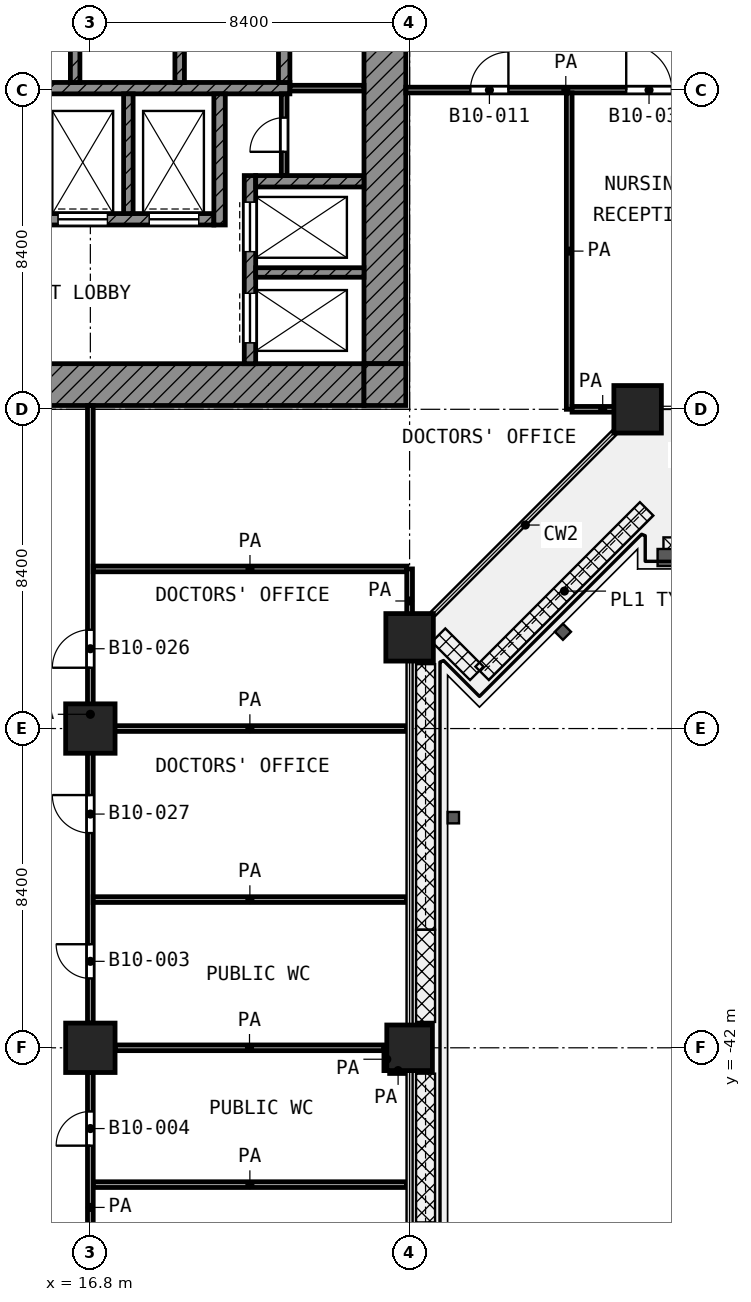
"""IFC4 building model, lengths in metres.
Left out: names, types, materials, properties, quantities, classifications, styles, units other than length and angle.
Written with IfcOpenShell. Run it as: python <this file> out.ifc"""

import sys

from ifc_helpers import new_model, si_unit, direction, frame, frame_2d, origin, origin_2d, place, context, subcontext, project, spatial, rectangle, extrude, element, fill, save


model = new_model("IFC4")
c1 = context("Model", 3, precision=1e-05, world=origin(), true_north=direction((0.0, 1.0)))
c2 = subcontext(c1, "Body", "Model", "MODEL_VIEW")
j1 = project(units=[si_unit("LENGTHUNIT", "METRE"), si_unit("PLANEANGLEUNIT", "RADIAN")], contexts=[c1])
p1 = place(None, origin())
s1 = spatial("IfcSite", under=j1, at=p1, CompositionType="ELEMENT")
p2 = place(p1, origin())
s2 = spatial("IfcBuilding", under=s1, at=p2, CompositionType="ELEMENT")
p3 = place(p2, frame((0.0, 0.0, 47.6)))
s3 = spatial("IfcBuildingStorey", under=s2, at=p3, CompositionType="ELEMENT", Elevation=47.6)
for number, where, z_axis, x_axis in (
    (1, (31.2, -25.2, 0.0), (0.0, 0.0, 1.0), (1.0, 0.0, 0.0)),
    (2, (25.2, -31.2, 0.0), (0.0, 0.0, 1.0), (1.0, 0.0, 0.0)),
):
    element("IfcColumn", number, at=place(p3, frame(where, z_axis=z_axis, x_axis=x_axis)), inside=s3, PredefinedType="COLUMN", context=c2, shape_type="SweptSolid", body=[
        extrude(rectangle(XDim=1.25, YDim=1.25, at=origin_2d()), origin(), (0.0, 0.0, 1.0), 4.2),
    ])
for number, where, z_axis, x_axis in (
    (3, (16.8, -33.6, 0.0), (0.0, 0.0, 1.0), (1.0, 0.0, 0.0)),
    (4, (16.8, -42.0, 0.0), (0.0, 0.0, 1.0), (1.0, 0.0, 0.0)),
):
    element("IfcColumn", number, at=place(p3, frame(where, z_axis=z_axis, x_axis=x_axis)), inside=s3, PredefinedType="COLUMN", context=c2, shape_type="SweptSolid", body=[
        extrude(rectangle(XDim=1.3, YDim=1.3, at=origin_2d()), origin(), (0.0, 0.0, 1.0), 4.2),
    ])
p4 = place(p3, frame((25.2, -42.0, 0.0), z_axis=(0.0, 0.0, 1.0), x_axis=(1.0, 0.0, 0.0)))
e5 = element("IfcColumn", 5, at=p4, inside=s3, PredefinedType="COLUMN", context=c2, shape_type="SweptSolid", body=[
    extrude(rectangle(XDim=1.2, YDim=1.2, at=origin_2d()), origin(), (0.0, 0.0, 1.0), 4.2),
])
p5 = place(p3, frame((24.55, -24.0, 0.0), z_axis=(0.0, 0.0, 1.0), x_axis=(0.0, 1.0, 0.0)))
e6 = element("IfcWall", 6, at=p5, inside=s3, PredefinedType="SHEAR", context=c2, shape_type="SweptSolid", body=[
    extrude(rectangle(XDim=18.6, YDim=1.1, at=frame_2d((9.3, 0.0))), origin(), (0.0, 0.0, 1.0), 3.78),
])
p6 = place(p5, frame((10.5, 0.0, 0.0)))
e7 = element("IfcOpeningElement", 7, at=p6, cuts=e6, PredefinedType="OPENING", context=c2, shape_type="SweptSolid", body=[
    extrude(rectangle(XDim=1.8, YDim=2.1, at=frame_2d((0.9, 1.05))), frame((0.0, 0.56, 0.0), z_axis=(0.0, -1.0, 0.0), x_axis=(1.0, 0.0, 0.0)), (0.0, 0.0, 1.0), 1.12),
])
p7 = place(p3, frame((5.4, -24.55, 0.0), z_axis=(0.0, 0.0, 1.0), x_axis=(1.0, 0.0, 0.0)))
e8 = element("IfcWall", 8, at=p7, inside=s3, PredefinedType="SHEAR", context=c2, shape_type="SweptSolid", body=[
    extrude(rectangle(XDim=18.6, YDim=1.1, at=frame_2d((9.3, 0.0))), origin(), (0.0, 0.0, 1.0), 3.78),
])
p8 = place(p7, frame((6.3, 0.0, 0.0)))
e9 = element("IfcOpeningElement", 9, at=p8, cuts=e8, PredefinedType="OPENING", context=c2, shape_type="SweptSolid", body=[
    extrude(rectangle(XDim=1.8, YDim=2.1, at=frame_2d((0.9, 1.05))), frame((0.0, 0.56, 0.0), z_axis=(0.0, -1.0, 0.0), x_axis=(1.0, 0.0, 0.0)), (0.0, 0.0, 1.0), 1.12),
])
p9 = place(p3, frame((24.55, -25.1, 0.0), z_axis=(0.0, 0.0, 1.0), x_axis=(0.0, 1.0, 0.0)))
e10 = element("IfcWall", 10, at=p9, inside=s3, PredefinedType="SHEAR", context=c2, shape_type="SweptSolid", body=[
    extrude(rectangle(XDim=1.1, YDim=1.1, at=frame_2d((0.55, 0.0))), origin(), (0.0, 0.0, 1.0), 3.78),
])
p10 = place(p3, frame((5.4, -16.75, 0.0), z_axis=(0.0, 0.0, 1.0), x_axis=(1.0, 0.0, 0.0)))
e11 = element("IfcWall", 11, at=p10, inside=s3, PredefinedType="SHEAR", context=c2, shape_type="SweptSolid", body=[
    extrude(rectangle(XDim=16.65, YDim=0.3, at=frame_2d((8.325, 0.0))), origin(), (0.0, 0.0, 1.0), 3.78),
])
p11 = place(p3, frame((5.4, -20.2, 0.0), z_axis=(0.0, 0.0, 1.0), x_axis=(1.0, 0.0, 0.0)))
e12 = element("IfcWall", 12, at=p11, inside=s3, PredefinedType="SHEAR", context=c2, shape_type="SweptSolid", body=[
    extrude(rectangle(XDim=14.65, YDim=0.3, at=frame_2d((7.325, 0.0))), origin(), (0.0, 0.0, 1.0), 3.78),
])
p12 = place(p11, frame((10.55, 0.0, 0.0)))
e13 = element("IfcOpeningElement", 13, at=p12, cuts=e12, PredefinedType="OPENING", context=c2, shape_type="SweptSolid", body=[
    extrude(rectangle(XDim=1.3, YDim=2.1, at=frame_2d((0.65, 1.05))), frame((0.0, 0.16, 0.0), z_axis=(0.0, -1.0, 0.0), x_axis=(1.0, 0.0, 0.0)), (0.0, 0.0, 1.0), 0.32),
])
p13 = place(p11, frame((12.95, 0.0, 0.0)))
e14 = element("IfcOpeningElement", 14, at=p13, cuts=e12, PredefinedType="OPENING", context=c2, shape_type="SweptSolid", body=[
    extrude(rectangle(XDim=1.3, YDim=2.1, at=frame_2d((0.65, 1.05))), frame((0.0, 0.16, 0.0), z_axis=(0.0, -1.0, 0.0), x_axis=(1.0, 0.0, 0.0)), (0.0, 0.0, 1.0), 0.32),
])
p14 = place(p11, frame((0.55, 0.0, 0.0)))
e15 = element("IfcOpeningElement", 15, at=p14, cuts=e12, PredefinedType="OPENING", context=c2, shape_type="SweptSolid", body=[
    extrude(rectangle(XDim=1.3, YDim=2.1, at=frame_2d((0.65, 1.05))), frame((0.0, 0.16, 0.0), z_axis=(0.0, -1.0, 0.0), x_axis=(1.0, 0.0, 0.0)), (0.0, 0.0, 1.0), 0.32),
])
p15 = place(p11, frame((2.95, 0.0, 0.0)))
e16 = element("IfcOpeningElement", 16, at=p15, cuts=e12, PredefinedType="OPENING", context=c2, shape_type="SweptSolid", body=[
    extrude(rectangle(XDim=1.3, YDim=2.1, at=frame_2d((0.65, 1.05))), frame((0.0, 0.16, 0.0), z_axis=(0.0, -1.0, 0.0), x_axis=(1.0, 0.0, 0.0)), (0.0, 0.0, 1.0), 0.32),
])
p16 = place(p11, frame((5.95, 0.0, 0.0)))
e17 = element("IfcOpeningElement", 17, at=p16, cuts=e12, PredefinedType="OPENING", context=c2, shape_type="SweptSolid", body=[
    extrude(rectangle(XDim=0.9, YDim=2.1, at=frame_2d((0.45, 1.05))), frame((0.0, 0.16, 0.0), z_axis=(0.0, -1.0, 0.0), x_axis=(1.0, 0.0, 0.0)), (0.0, 0.0, 1.0), 0.32),
])
p17 = place(p11, frame((8.35, 0.0, 0.0)))
e18 = element("IfcOpeningElement", 18, at=p17, cuts=e12, PredefinedType="OPENING", context=c2, shape_type="SweptSolid", body=[
    extrude(rectangle(XDim=0.9, YDim=2.1, at=frame_2d((0.45, 1.05))), frame((0.0, 0.16, 0.0), z_axis=(0.0, -1.0, 0.0), x_axis=(1.0, 0.0, 0.0)), (0.0, 0.0, 1.0), 0.32),
])
p18 = place(p3, frame((20.2, -20.35, 0.0), z_axis=(0.0, 0.0, 1.0), x_axis=(0.0, 1.0, 0.0)))
e19 = element("IfcWall", 19, at=p18, inside=s3, PredefinedType="SHEAR", context=c2, shape_type="SweptSolid", body=[
    extrude(rectangle(XDim=3.45, YDim=0.3, at=frame_2d((1.725, 0.0))), origin(), (0.0, 0.0, 1.0), 3.78),
])
p19 = place(p3, frame((21.9, -16.6, 0.0), z_axis=(0.0, 0.0, 1.0), x_axis=(0.0, 1.0, 0.0)))
e20 = element("IfcWall", 20, at=p19, inside=s3, PredefinedType="SHEAR", context=c2, shape_type="SweptSolid", body=[
    extrude(rectangle(XDim=2.35, YDim=0.3, at=frame_2d((1.175, 0.0))), origin(), (0.0, 0.0, 1.0), 3.78),
])
p20 = place(p3, frame((21.15, -19.2, 0.0), z_axis=(0.0, 0.0, 1.0), x_axis=(1.0, 0.0, 0.0)))
e21 = element("IfcWall", 21, at=p20, inside=s3, PredefinedType="SHEAR", context=c2, shape_type="SweptSolid", body=[
    extrude(rectangle(XDim=2.85, YDim=0.3, at=frame_2d((1.425, 0.0))), origin(), (0.0, 0.0, 1.0), 3.78),
])
p21 = place(p3, frame((21.0, -24.0, 0.0), z_axis=(0.0, 0.0, 1.0), x_axis=(0.0, 1.0, 0.0)))
e22 = element("IfcWall", 22, at=p21, inside=s3, PredefinedType="SHEAR", context=c2, shape_type="SweptSolid", body=[
    extrude(rectangle(XDim=4.95, YDim=0.3, at=frame_2d((2.475, 0.0))), origin(), (0.0, 0.0, 1.0), 3.78),
])
p22 = place(p21, frame((2.95, 0.0, 0.0)))
e23 = element("IfcOpeningElement", 23, at=p22, cuts=e22, PredefinedType="OPENING", context=c2, shape_type="SweptSolid", body=[
    extrude(rectangle(XDim=1.3, YDim=2.1, at=frame_2d((0.65, 1.05))), frame((0.0, 0.16, 0.0), z_axis=(0.0, -1.0, 0.0), x_axis=(1.0, 0.0, 0.0)), (0.0, 0.0, 1.0), 0.32),
])
p23 = place(p21, frame((0.55, 0.0, 0.0)))
e24 = element("IfcOpeningElement", 24, at=p23, cuts=e22, PredefinedType="OPENING", context=c2, shape_type="SweptSolid", body=[
    extrude(rectangle(XDim=1.3, YDim=2.1, at=frame_2d((0.65, 1.05))), frame((0.0, 0.16, 0.0), z_axis=(0.0, -1.0, 0.0), x_axis=(1.0, 0.0, 0.0)), (0.0, 0.0, 1.0), 0.32),
])
p24 = place(p3, frame((21.15, -21.6, 0.0), z_axis=(0.0, 0.0, 1.0), x_axis=(1.0, 0.0, 0.0)))
e25 = element("IfcWall", 25, at=p24, inside=s3, PredefinedType="SHEAR", context=c2, shape_type="SweptSolid", body=[
    extrude(rectangle(XDim=2.85, YDim=0.25, at=frame_2d((1.425, 0.0))), origin(), (0.0, 0.0, 1.0), 3.78),
])
p25 = place(p3, frame((17.8, -20.05, 0.0), z_axis=(0.0, 0.0, 1.0), x_axis=(0.0, 1.0, 0.0)))
e26 = element("IfcWall", 26, at=p25, inside=s3, PredefinedType="SHEAR", context=c2, shape_type="SweptSolid", body=[
    extrude(rectangle(XDim=3.15, YDim=0.25, at=frame_2d((1.575, 0.0))), origin(), (0.0, 0.0, 1.0), 3.78),
])
for number, where, z_axis, x_axis in (
    (27, (16.4, -16.6, 0.0), (0.0, 0.0, 1.0), (0.0, 1.0, 0.0)),
    (28, (19.15, -16.6, 0.0), (0.0, 0.0, 1.0), (0.0, 1.0, 0.0)),
):
    element("IfcWall", number, at=place(p3, frame(where, z_axis=z_axis, x_axis=x_axis)), inside=s3, PredefinedType="SHEAR", context=c2, shape_type="SweptSolid", body=[
        extrude(rectangle(XDim=2.35, YDim=0.25, at=frame_2d((1.175, 0.0))), origin(), (0.0, 0.0, 1.0), 3.78),
    ])
p26 = place(p3, frame((21.9, -19.05, 0.0), z_axis=(0.0, 0.0, 1.0), x_axis=(0.0, 1.0, 0.0)))
e29 = element("IfcWall", 29, at=p26, inside=s3, PredefinedType="PARTITIONING", context=c2, shape_type="SweptSolid", body=[
    extrude(rectangle(XDim=2.15, YDim=0.15, at=frame_2d((1.075, 0.0))), origin(), (0.0, 0.0, 1.0), 3.78),
])
p27 = place(p26, frame((0.625, 0.0, 0.0)))
e30 = element("IfcOpeningElement", 30, at=p27, cuts=e29, PredefinedType="OPENING", context=c2, shape_type="SweptSolid", body=[
    extrude(rectangle(XDim=0.9, YDim=2.1, at=frame_2d((0.45, 1.05))), frame((0.0, 0.085, 0.0), z_axis=(0.0, -1.0, 0.0), x_axis=(1.0, 0.0, 0.0)), (0.0, 0.0, 1.0), 0.17),
])
p28 = place(p3, frame((22.05, -16.75, 0.0), z_axis=(0.0, 0.0, 1.0), x_axis=(1.0, 0.0, 0.0)))
e31 = element("IfcWall", 31, at=p28, inside=s3, PredefinedType="PARTITIONING", context=c2, shape_type="SweptSolid", body=[
    extrude(rectangle(XDim=1.95, YDim=0.15, at=frame_2d((0.975, 0.0))), origin(), (0.0, 0.0, 1.0), 3.78),
])
p29 = place(p3, frame((16.875, -45.6, 0.0), z_axis=(0.0, 0.0, 1.0), x_axis=(1.0, 0.0, 0.0)))
e32 = element("IfcWall", 32, at=p29, inside=s3, PredefinedType="PARTITIONING", context=c2, shape_type="SweptSolid", body=[
    extrude(rectangle(XDim=8.245, YDim=0.15, at=frame_2d((4.123, 0.0))), origin(), (0.0, 0.0, 1.0), 3.78),
])
p30 = place(p3, frame((24.675, -42.6, 0.0), z_axis=(0.0, 0.0, 1.0), x_axis=(1.0, 0.0, 0.0)))
e33 = element("IfcWall", 33, at=p30, inside=s3, PredefinedType="PARTITIONING", context=c2, shape_type="SweptSolid", body=[
    extrude(rectangle(XDim=0.445, YDim=0.15, at=frame_2d((0.223, 0.0))), origin(), (0.0, 0.0, 1.0), 3.78),
])
p31 = place(p3, frame((17.452, -42.0, 0.0), z_axis=(0.0, 0.0, 1.0), x_axis=(1.0, 0.0, 0.0)))
e34 = element("IfcWall", 34, at=p31, inside=s3, PredefinedType="PARTITIONING", context=c2, shape_type="SweptSolid", body=[
    extrude(rectangle(XDim=7.071, YDim=0.15, at=frame_2d((3.536, 0.0))), origin(), (0.0, 0.0, 1.0), 3.78),
])
for number, where, z_axis, x_axis in (
    (35, (16.875, -38.1, 0.0), (0.0, 0.0, 1.0), (1.0, 0.0, 0.0)),
    (36, (16.875, -33.6, 0.0), (0.0, 0.0, 1.0), (1.0, 0.0, 0.0)),
):
    element("IfcWall", number, at=place(p3, frame(where, z_axis=z_axis, x_axis=x_axis)), inside=s3, PredefinedType="PARTITIONING", context=c2, shape_type="SweptSolid", body=[
        extrude(rectangle(XDim=8.245, YDim=0.15, at=frame_2d((4.123, 0.0))), origin(), (0.0, 0.0, 1.0), 3.78),
    ])
p32 = place(p3, frame((16.875, -29.4, 0.0), z_axis=(0.0, 0.0, 1.0), x_axis=(1.0, 0.0, 0.0)))
e37 = element("IfcWall", 37, at=p32, inside=s3, PredefinedType="PARTITIONING", context=c2, shape_type="SweptSolid", body=[
    extrude(rectangle(XDim=8.25, YDim=0.15, at=frame_2d((4.125, 0.0))), origin(), (0.0, 0.0, 1.0), 3.78),
])
p33 = place(p3, frame((29.475, -25.2, 0.0), z_axis=(0.0, 0.0, 1.0), x_axis=(1.0, 0.0, 0.0)))
e38 = element("IfcWall", 38, at=p33, inside=s3, PredefinedType="PARTITIONING", context=c2, shape_type="SweptSolid", body=[
    extrude(rectangle(XDim=1.612, YDim=0.15, at=frame_2d((0.806, 0.0))), origin(), (0.0, 0.0, 1.0), 3.78),
])
p34 = place(p3, frame((25.1, -16.8, 0.0), z_axis=(0.0, 0.0, 1.0), x_axis=(1.0, 0.0, 0.0)))
e39 = element("IfcWall", 39, at=p34, inside=s3, PredefinedType="PARTITIONING", context=c2, shape_type="SweptSolid", body=[
    extrude(rectangle(XDim=8.42, YDim=0.15, at=frame_2d((4.21, 0.0))), origin(), (0.0, 0.0, 1.0), 3.78),
])
p35 = place(p34, frame((1.7, 0.0, 0.0)))
e40 = element("IfcOpeningElement", 40, at=p35, cuts=e39, PredefinedType="OPENING", context=c2, shape_type="SweptSolid", body=[
    extrude(rectangle(XDim=1.0, YDim=2.1, at=frame_2d((0.5, 1.05))), frame((0.0, 0.085, 0.0), z_axis=(0.0, -1.0, 0.0), x_axis=(1.0, 0.0, 0.0)), (0.0, 0.0, 1.0), 0.17),
])
p36 = place(p34, frame((5.8, 0.0, 0.0)))
e41 = element("IfcOpeningElement", 41, at=p36, cuts=e39, PredefinedType="OPENING", context=c2, shape_type="SweptSolid", body=[
    extrude(rectangle(XDim=1.2, YDim=2.1, at=frame_2d((0.6, 1.05))), frame((0.0, 0.085, 0.0), z_axis=(0.0, -1.0, 0.0), x_axis=(1.0, 0.0, 0.0)), (0.0, 0.0, 1.0), 0.17),
])
p37 = place(p3, frame((16.8, -49.75, 0.0), z_axis=(0.0, 0.0, 1.0), x_axis=(0.0, 1.0, 0.0)))
e42 = element("IfcWall", 42, at=p37, inside=s3, PredefinedType="PARTITIONING", context=c2, shape_type="SweptSolid", body=[
    extrude(rectangle(XDim=7.1, YDim=0.15, at=frame_2d((3.55, 0.0))), origin(), (0.0, 0.0, 1.0), 3.78),
])
p38 = place(p37, frame((5.175, 0.0, 0.0)))
e43 = element("IfcOpeningElement", 43, at=p38, cuts=e42, PredefinedType="OPENING", context=c2, shape_type="SweptSolid", body=[
    extrude(rectangle(XDim=0.9, YDim=2.1, at=frame_2d((0.45, 1.05))), frame((0.0, 0.085, 0.0), z_axis=(0.0, -1.0, 0.0), x_axis=(1.0, 0.0, 0.0)), (0.0, 0.0, 1.0), 0.17),
])
p39 = place(p37, frame((1.625, 0.0, 0.0)))
e44 = element("IfcOpeningElement", 44, at=p39, cuts=e42, PredefinedType="OPENING", context=c2, shape_type="SweptSolid", body=[
    extrude(rectangle(XDim=0.9, YDim=2.1, at=frame_2d((0.45, 1.05))), frame((0.0, 0.085, 0.0), z_axis=(0.0, -1.0, 0.0), x_axis=(1.0, 0.0, 0.0)), (0.0, 0.0, 1.0), 0.17),
])
p40 = place(p3, frame((16.8, -41.35, 0.0), z_axis=(0.0, 0.0, 1.0), x_axis=(0.0, 1.0, 0.0)))
e45 = element("IfcWall", 45, at=p40, inside=s3, PredefinedType="PARTITIONING", context=c2, shape_type="SweptSolid", body=[
    extrude(rectangle(XDim=16.25, YDim=0.15, at=frame_2d((8.125, 0.0))), origin(), (0.0, 0.0, 1.0), 3.78),
])
p41 = place(p40, frame((9.35, 0.0, 0.0)))
e46 = element("IfcOpeningElement", 46, at=p41, cuts=e45, PredefinedType="OPENING", context=c2, shape_type="SweptSolid", body=[
    extrude(rectangle(XDim=1.0, YDim=2.1, at=frame_2d((0.5, 1.05))), frame((0.0, 0.085, 0.0), z_axis=(0.0, -1.0, 0.0), x_axis=(1.0, 0.0, 0.0)), (0.0, 0.0, 1.0), 0.17),
])
p42 = place(p40, frame((5.0, 0.0, 0.0)))
e47 = element("IfcOpeningElement", 47, at=p42, cuts=e45, PredefinedType="OPENING", context=c2, shape_type="SweptSolid", body=[
    extrude(rectangle(XDim=1.0, YDim=2.1, at=frame_2d((0.5, 1.05))), frame((0.0, 0.085, 0.0), z_axis=(0.0, -1.0, 0.0), x_axis=(1.0, 0.0, 0.0)), (0.0, 0.0, 1.0), 0.17),
])
p43 = place(p40, frame((1.175, 0.0, 0.0)))
e48 = element("IfcOpeningElement", 48, at=p43, cuts=e45, PredefinedType="OPENING", context=c2, shape_type="SweptSolid", body=[
    extrude(rectangle(XDim=0.9, YDim=2.1, at=frame_2d((0.45, 1.05))), frame((0.0, 0.085, 0.0), z_axis=(0.0, -1.0, 0.0), x_axis=(1.0, 0.0, 0.0)), (0.0, 0.0, 1.0), 0.17),
])
p44 = place(p3, frame((24.6, -42.6, 0.0), z_axis=(0.0, 0.0, 1.0), x_axis=(0.0, 1.0, 0.0)))
e49 = element("IfcWall", 49, at=p44, inside=s3, PredefinedType="PARTITIONING", context=c2, shape_type="SweptSolid", body=[
    extrude(rectangle(XDim=0.598, YDim=0.15, at=frame_2d((0.299, 0.0))), origin(), (0.0, 0.0, 1.0), 3.78),
])
p45 = place(p3, frame((25.2, -31.087, 0.0), z_axis=(0.0, 0.0, 1.0), x_axis=(0.0, 1.0, 0.0)))
e50 = element("IfcWall", 50, at=p45, inside=s3, PredefinedType="PARTITIONING", context=c2, shape_type="SweptSolid", body=[
    extrude(rectangle(XDim=1.687, YDim=0.15, at=frame_2d((0.844, 0.0))), origin(), (0.0, 0.0, 1.0), 3.78),
])
p46 = place(p3, frame((29.4, -25.2, 0.0), z_axis=(0.0, 0.0, 1.0), x_axis=(0.0, 1.0, 0.0)))
e51 = element("IfcWall", 51, at=p46, inside=s3, PredefinedType="PARTITIONING", context=c2, shape_type="SweptSolid", body=[
    extrude(rectangle(XDim=8.325, YDim=0.15, at=frame_2d((4.163, 0.0))), origin(), (0.0, 0.0, 1.0), 3.78),
])
p47 = place(p22, origin())
e52 = element("IfcDoor", 52, at=p47, inside=s3, OperationType="DOUBLE_DOOR_SLIDING", PredefinedType="DOOR", context=c2, shape_type="SweptSolid", body=[
    extrude(rectangle(XDim=1.3, YDim=2.1, at=frame_2d((0.65, 1.05))), frame((0.0, 0.025, 0.0), z_axis=(0.0, -1.0, 0.0), x_axis=(1.0, 0.0, 0.0)), (0.0, 0.0, 1.0), 0.05),
])
fill(e23, e52)
p48 = place(p23, origin())
e53 = element("IfcDoor", 53, at=p48, inside=s3, OperationType="DOUBLE_DOOR_SLIDING", PredefinedType="DOOR", context=c2, shape_type="SweptSolid", body=[
    extrude(rectangle(XDim=1.3, YDim=2.1, at=frame_2d((0.65, 1.05))), frame((0.0, 0.025, 0.0), z_axis=(0.0, -1.0, 0.0), x_axis=(1.0, 0.0, 0.0)), (0.0, 0.0, 1.0), 0.05),
])
fill(e24, e53)
p49 = place(p12, origin())
e54 = element("IfcDoor", 54, at=p49, inside=s3, OperationType="DOUBLE_DOOR_SLIDING", PredefinedType="DOOR", context=c2, shape_type="SweptSolid", body=[
    extrude(rectangle(XDim=1.3, YDim=2.1, at=frame_2d((0.65, 1.05))), frame((0.0, 0.025, 0.0), z_axis=(0.0, -1.0, 0.0), x_axis=(1.0, 0.0, 0.0)), (0.0, 0.0, 1.0), 0.05),
])
fill(e13, e54)
p50 = place(p13, origin())
e55 = element("IfcDoor", 55, at=p50, inside=s3, OperationType="DOUBLE_DOOR_SLIDING", PredefinedType="DOOR", context=c2, shape_type="SweptSolid", body=[
    extrude(rectangle(XDim=1.3, YDim=2.1, at=frame_2d((0.65, 1.05))), frame((0.0, 0.025, 0.0), z_axis=(0.0, -1.0, 0.0), x_axis=(1.0, 0.0, 0.0)), (0.0, 0.0, 1.0), 0.05),
])
fill(e14, e55)
p51 = place(p27, origin())
e56 = element("IfcDoor", 56, at=p51, inside=s3, OperationType="SINGLE_SWING_LEFT", PredefinedType="DOOR", context=c2, shape_type="SweptSolid", body=[
    extrude(rectangle(XDim=0.9, YDim=2.1, at=frame_2d((0.45, 1.05))), frame((0.0, 0.025, 0.0), z_axis=(0.0, -1.0, 0.0), x_axis=(1.0, 0.0, 0.0)), (0.0, 0.0, 1.0), 0.05),
])
fill(e30, e56)
p52 = place(p35, origin())
e57 = element("IfcDoor", 57, at=p52, inside=s3, OperationType="SINGLE_SWING_RIGHT", PredefinedType="DOOR", context=c2, shape_type="SweptSolid", body=[
    extrude(rectangle(XDim=1.0, YDim=2.1, at=frame_2d((0.5, 1.05))), frame((0.0, 0.025, 0.0), z_axis=(0.0, -1.0, 0.0), x_axis=(1.0, 0.0, 0.0)), (0.0, 0.0, 1.0), 0.05),
])
fill(e40, e57)
p53 = place(p36, origin())
e58 = element("IfcDoor", 58, at=p53, inside=s3, OperationType="SINGLE_SWING_LEFT", PredefinedType="DOOR", context=c2, shape_type="SweptSolid", body=[
    extrude(rectangle(XDim=1.2, YDim=2.1, at=frame_2d((0.6, 1.05))), frame((0.0, 0.025, 0.0), z_axis=(0.0, -1.0, 0.0), x_axis=(1.0, 0.0, 0.0)), (0.0, 0.0, 1.0), 0.05),
])
fill(e41, e58)
p54 = place(p41, origin())
e59 = element("IfcDoor", 59, at=p54, inside=s3, OperationType="SINGLE_SWING_LEFT", PredefinedType="DOOR", context=c2, shape_type="SweptSolid", body=[
    extrude(rectangle(XDim=1.0, YDim=2.1, at=frame_2d((0.5, 1.05))), frame((0.0, 0.025, 0.0), z_axis=(0.0, -1.0, 0.0), x_axis=(1.0, 0.0, 0.0)), (0.0, 0.0, 1.0), 0.05),
])
fill(e46, e59)
p55 = place(p42, origin())
e60 = element("IfcDoor", 60, at=p55, inside=s3, OperationType="SINGLE_SWING_RIGHT", PredefinedType="DOOR", context=c2, shape_type="SweptSolid", body=[
    extrude(rectangle(XDim=1.0, YDim=2.1, at=frame_2d((0.5, 1.05))), frame((0.0, 0.025, 0.0), z_axis=(0.0, -1.0, 0.0), x_axis=(1.0, 0.0, 0.0)), (0.0, 0.0, 1.0), 0.05),
])
fill(e47, e60)
p56 = place(p43, origin())
e61 = element("IfcDoor", 61, at=p56, inside=s3, OperationType="SINGLE_SWING_RIGHT", PredefinedType="DOOR", context=c2, shape_type="SweptSolid", body=[
    extrude(rectangle(XDim=0.9, YDim=2.1, at=frame_2d((0.45, 1.05))), frame((0.0, 0.025, 0.0), z_axis=(0.0, -1.0, 0.0), x_axis=(1.0, 0.0, 0.0)), (0.0, 0.0, 1.0), 0.05),
])
fill(e48, e61)
p57 = place(p38, origin())
e62 = element("IfcDoor", 62, at=p57, inside=s3, OperationType="SINGLE_SWING_LEFT", PredefinedType="DOOR", context=c2, shape_type="SweptSolid", body=[
    extrude(rectangle(XDim=0.9, YDim=2.1, at=frame_2d((0.45, 1.05))), frame((0.0, 0.025, 0.0), z_axis=(0.0, -1.0, 0.0), x_axis=(1.0, 0.0, 0.0)), (0.0, 0.0, 1.0), 0.05),
])
fill(e43, e62)
save(model, sys.argv[1])
